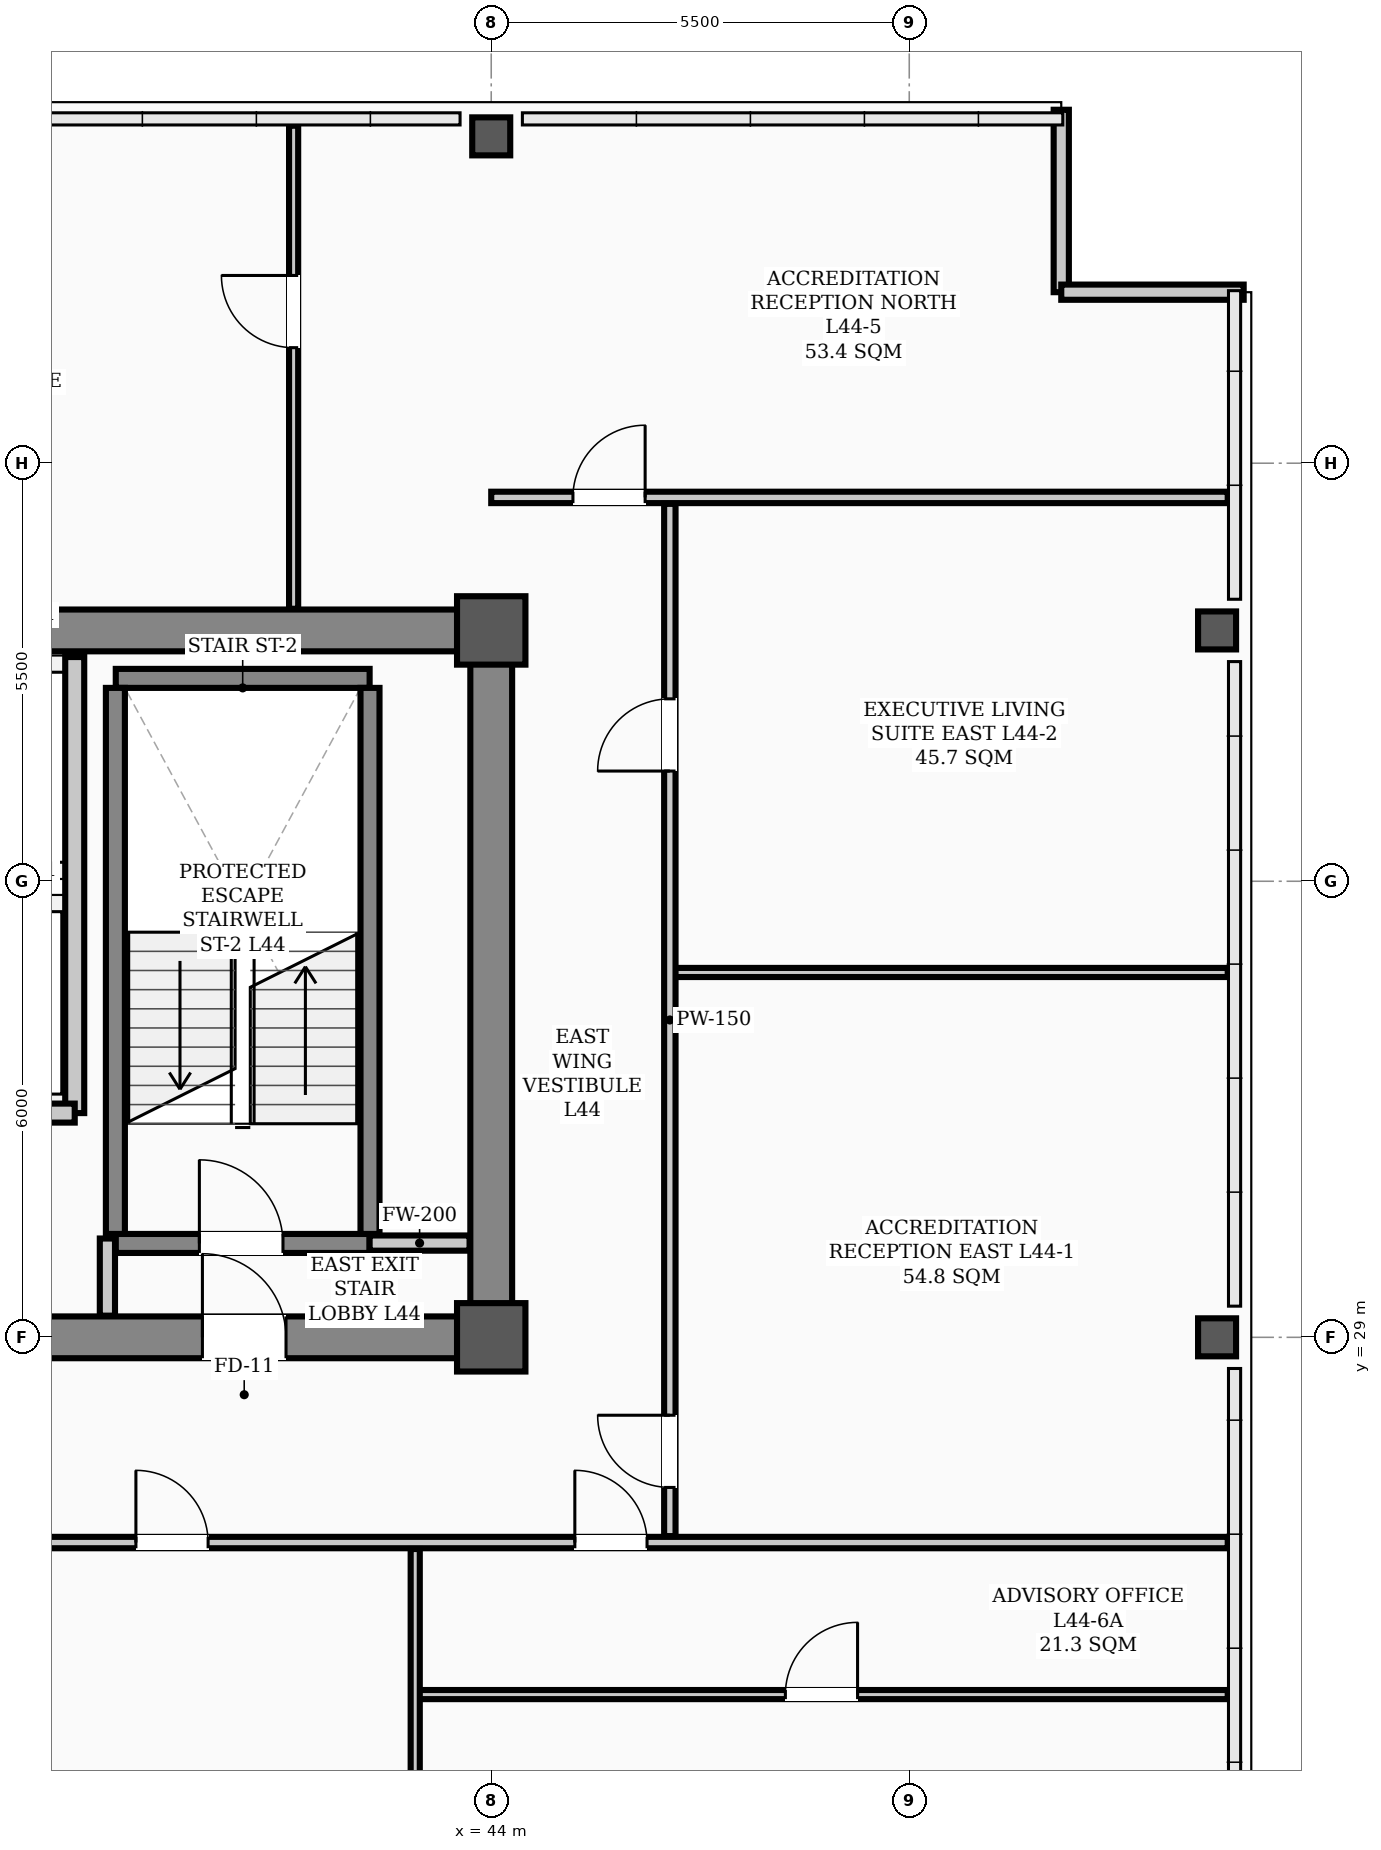
"""IFC4 building model, lengths in metres.
Left out: names, types, materials, properties, quantities, classifications, styles, units other than length and angle.
Written with IfcOpenShell. Run it as: python <this file> out.ifc"""

import sys

from ifc_helpers import new_model, si_unit, direction, frame, frame_2d, origin, origin_2d, place, context, subcontext, project, spatial, rectangle, hollow_rectangle, extrude, element, fill, save


model = new_model("IFC4")
c1 = context("Model", 3, precision=1e-05, world=origin(), true_north=direction((0.0, 1.0)))
c2 = subcontext(c1, "Body", "Model", "MODEL_VIEW")
j1 = project(units=[si_unit("LENGTHUNIT", "METRE"), si_unit("PLANEANGLEUNIT", "RADIAN")], contexts=[c1])
p1 = place(None, origin())
s1 = spatial("IfcSite", under=j1, at=p1, CompositionType="ELEMENT")
p2 = place(p1, origin())
s2 = spatial("IfcBuilding", under=s1, at=p2, CompositionType="ELEMENT")
p3 = place(p2, frame((0.0, 0.0, 177.3)))
s3 = spatial("IfcBuildingStorey", under=s2, at=p3, CompositionType="ELEMENT", Elevation=177.3)
for number, where, z_axis, x_axis in (
    (1, (44.0, 29.0, 0.0), (0.0, 0.0, 1.0), (1.0, 0.0, 0.0)),
    (2, (44.0, 38.3, 0.0), (0.0, 0.0, 1.0), (1.0, 0.0, 0.0)),
):
    element("IfcColumn", number, at=place(p3, frame(where, z_axis=z_axis, x_axis=x_axis)), inside=s3, PredefinedType="COLUMN", context=c2, shape_type="SweptSolid", body=[
        extrude(hollow_rectangle(XDim=0.9, YDim=0.9, WallThickness=0.035, InnerFilletRadius=0.017, OuterFilletRadius=0.052, at=origin_2d()), origin(), (0.0, 0.0, 1.0), 3.9),
    ])
for number, where, z_axis, x_axis in (
    (3, (44.0, 44.8, 0.0), (0.0, 0.0, 1.0), (1.0, 0.0, 0.0)),
    (4, (53.55, 29.0, 0.0), (0.0, 0.0, 1.0), (1.0, 0.0, 0.0)),
    (5, (53.55, 38.3, 0.0), (0.0, 0.0, 1.0), (1.0, 0.0, 0.0)),
):
    element("IfcColumn", number, at=place(p3, frame(where, z_axis=z_axis, x_axis=x_axis)), inside=s3, PredefinedType="COLUMN", context=c2, shape_type="SweptSolid", body=[
        extrude(hollow_rectangle(XDim=0.5, YDim=0.5, WallThickness=0.024, InnerFilletRadius=0.012, OuterFilletRadius=0.036, at=origin_2d()), origin(), (0.0, 0.0, 1.0), 3.9),
    ])
for number, where, z_axis, x_axis in (
    (6, (51.5, 45.15, 0.0), (0.0, 0.0, 1.0), (0.0, -1.0, 0.0)),
    (7, (51.5, 42.75, 0.0), (0.0, 0.0, 1.0), (1.0, 0.0, 0.0)),
):
    element("IfcWall", number, at=place(p3, frame(where, z_axis=z_axis, x_axis=x_axis)), inside=s3, PredefinedType="PARAPET", context=c2, shape_type="SweptSolid", body=[
        extrude(rectangle(XDim=2.4, YDim=0.2, at=frame_2d((1.2, 0.0))), origin(), (0.0, 0.0, 1.0), 1.2),
    ])
p4 = place(p3, frame((13.5, 29.0, 0.0), z_axis=(0.0, 0.0, 1.0), x_axis=(1.0, 0.0, 0.0)))
e8 = element("IfcWall", 8, at=p4, inside=s3, PredefinedType="SHEAR", context=c2, shape_type="SweptSolid", body=[
    extrude(rectangle(XDim=30.5, YDim=0.55, at=frame_2d((15.25, 0.0))), origin(), (0.0, 0.0, 1.0), 3.72),
])
p5 = place(p4, frame((1.75, 0.0, 0.0)))
e9 = element("IfcOpeningElement", 9, at=p5, cuts=e8, PredefinedType="OPENING", context=c2, shape_type="SweptSolid", body=[
    extrude(rectangle(XDim=1.1, YDim=2.08, at=frame_2d((0.55, 1.04))), frame((0.0, 0.285, 0.0), z_axis=(0.0, -1.0, 0.0), x_axis=(1.0, 0.0, 0.0)), (0.0, 0.0, 1.0), 0.57),
])
p6 = place(p4, frame((26.7, 0.0, 0.0)))
e10 = element("IfcOpeningElement", 10, at=p6, cuts=e8, PredefinedType="OPENING", context=c2, shape_type="SweptSolid", body=[
    extrude(rectangle(XDim=1.1, YDim=2.08, at=frame_2d((0.55, 1.04))), frame((0.0, 0.285, 0.0), z_axis=(0.0, -1.0, 0.0), x_axis=(1.0, 0.0, 0.0)), (0.0, 0.0, 1.0), 0.57),
])
p7 = place(p4, frame((6.8, 0.0, 0.0)))
e11 = element("IfcOpeningElement", 11, at=p7, cuts=e8, PredefinedType="OPENING", context=c2, shape_type="SweptSolid", body=[
    extrude(rectangle(XDim=1.1, YDim=2.08, at=frame_2d((0.55, 1.04))), frame((0.0, 0.285, 0.0), z_axis=(0.0, -1.0, 0.0), x_axis=(1.0, 0.0, 0.0)), (0.0, 0.0, 1.0), 0.57),
])
p8 = place(p4, frame((13.2, 0.0, 0.0)))
e12 = element("IfcOpeningElement", 12, at=p8, cuts=e8, PredefinedType="OPENING", context=c2, shape_type="SweptSolid", body=[
    extrude(rectangle(XDim=1.6, YDim=2.08, at=frame_2d((0.8, 1.04))), frame((0.0, 0.285, 0.0), z_axis=(0.0, -1.0, 0.0), x_axis=(1.0, 0.0, 0.0)), (0.0, 0.0, 1.0), 0.57),
])
p9 = place(p4, frame((19.53, 0.0, 0.0)))
e13 = element("IfcOpeningElement", 13, at=p9, cuts=e8, PredefinedType="OPENING", context=c2, shape_type="SweptSolid", body=[
    extrude(rectangle(XDim=0.9, YDim=2.08, at=frame_2d((0.45, 1.04))), frame((0.0, 0.285, 0.0), z_axis=(0.0, -1.0, 0.0), x_axis=(1.0, 0.0, 0.0)), (0.0, 0.0, 1.0), 0.57),
])
p10 = place(p4, frame((21.57, 0.0, 0.0)))
e14 = element("IfcOpeningElement", 14, at=p10, cuts=e8, PredefinedType="OPENING", context=c2, shape_type="SweptSolid", body=[
    extrude(rectangle(XDim=0.9, YDim=2.08, at=frame_2d((0.45, 1.04))), frame((0.0, 0.285, 0.0), z_axis=(0.0, -1.0, 0.0), x_axis=(1.0, 0.0, 0.0)), (0.0, 0.0, 1.0), 0.57),
])
p11 = place(p3, frame((13.5, 38.3, 0.0), z_axis=(0.0, 0.0, 1.0), x_axis=(1.0, 0.0, 0.0)))
e15 = element("IfcWall", 15, at=p11, inside=s3, PredefinedType="SHEAR", context=c2, shape_type="SweptSolid", body=[
    extrude(rectangle(XDim=30.5, YDim=0.55, at=frame_2d((15.25, 0.0))), origin(), (0.0, 0.0, 1.0), 3.72),
])
p12 = place(p3, frame((44.0, 29.35, 0.0), z_axis=(0.0, 0.0, 1.0), x_axis=(0.0, 1.0, 0.0)))
e16 = element("IfcWall", 16, at=p12, inside=s3, PredefinedType="SHEAR", context=c2, shape_type="SweptSolid", body=[
    extrude(rectangle(XDim=8.6, YDim=0.55, at=frame_2d((4.3, 0.0))), origin(), (0.0, 0.0, 1.0), 3.72),
])
p13 = place(p3, frame((39.06, 30.235, 0.0), z_axis=(0.0, 0.0, 1.0), x_axis=(1.0, 0.0, 0.0)))
e17 = element("IfcWall", 17, at=p13, inside=s3, PredefinedType="STANDARD", context=c2, shape_type="SweptSolid", body=[
    extrude(rectangle(XDim=3.34, YDim=0.25, at=frame_2d((1.67, 0.0))), origin(), (0.0, 0.0, 1.0), 3.72),
])
p14 = place(p13, frame((1.1, 0.0, 0.0)))
e18 = element("IfcOpeningElement", 18, at=p14, cuts=e17, PredefinedType="OPENING", context=c2, shape_type="SweptSolid", body=[
    extrude(rectangle(XDim=1.1, YDim=2.08, at=frame_2d((0.55, 1.04))), frame((0.0, 0.135, 0.0), z_axis=(0.0, -1.0, 0.0), x_axis=(1.0, 0.0, 0.0)), (0.0, 0.0, 1.0), 0.27),
])
p15 = place(p3, frame((39.06, 37.669, 0.0), z_axis=(0.0, 0.0, 1.0), x_axis=(1.0, 0.0, 0.0)))
e19 = element("IfcWall", 19, at=p15, inside=s3, PredefinedType="STANDARD", context=c2, shape_type="SweptSolid", body=[
    extrude(rectangle(XDim=3.34, YDim=0.25, at=frame_2d((1.67, 0.0))), origin(), (0.0, 0.0, 1.0), 3.72),
])
for number, where, z_axis, x_axis in (
    (20, (39.055, 30.36, 0.0), (0.0, 0.0, 1.0), (0.0, 1.0, 0.0)),
    (21, (42.405, 30.36, 0.0), (0.0, 0.0, 1.0), (0.0, 1.0, 0.0)),
):
    element("IfcWall", number, at=place(p3, frame(where, z_axis=z_axis, x_axis=x_axis)), inside=s3, PredefinedType="STANDARD", context=c2, shape_type="SweptSolid", body=[
        extrude(rectangle(XDim=7.184, YDim=0.25, at=frame_2d((3.592, 0.0))), origin(), (0.0, 0.0, 1.0), 3.72),
    ])
p16 = place(p3, frame((38.52, 31.95, 0.0), z_axis=(0.0, 0.0, 1.0), x_axis=(0.0, 1.0, 0.0)))
e22 = element("IfcWall", 22, at=p16, inside=s3, PredefinedType="STANDARD", context=c2, shape_type="SweptSolid", body=[
    extrude(rectangle(XDim=6.0, YDim=0.25, at=frame_2d((3.0, 0.0))), origin(), (0.0, 0.0, 1.0), 3.35),
])
p17 = place(p3, frame((36.62, 31.95, 0.0), z_axis=(0.0, 0.0, 1.0), x_axis=(1.0, 0.0, 0.0)))
e23 = element("IfcWall", 23, at=p17, inside=s3, PredefinedType="STANDARD", context=c2, shape_type="SweptSolid", body=[
    extrude(rectangle(XDim=1.9, YDim=0.25, at=frame_2d((0.95, 0.0))), origin(), (0.0, 0.0, 1.0), 3.48),
])
p18 = place(p3, frame((42.4, 30.24, 0.0), z_axis=(0.0, 0.0, 1.0), x_axis=(1.0, 0.0, 0.0)))
e24 = element("IfcWall", 24, at=p18, inside=s3, PredefinedType="STANDARD", context=c2, shape_type="SweptSolid", body=[
    extrude(rectangle(XDim=1.315, YDim=0.2, at=frame_2d((0.658, 0.0))), origin(), (0.0, 0.0, 1.0), 3.2),
])
p19 = place(p3, frame((10.31, 26.3, 0.0), z_axis=(0.0, 0.0, 1.0), x_axis=(1.0, 0.0, 0.0)))
e25 = element("IfcWall", 25, at=p19, inside=s3, PredefinedType="PARTITIONING", context=c2, shape_type="SweptSolid", body=[
    extrude(rectangle(XDim=43.38, YDim=0.15, at=frame_2d((21.69, 0.0))), origin(), (0.0, 0.0, 1.0), 3.2),
])
p20 = place(p19, frame((0.575, 0.0, 0.0)))
e26 = element("IfcOpeningElement", 26, at=p20, cuts=e25, PredefinedType="OPENING", context=c2, shape_type="SweptSolid", body=[
    extrude(rectangle(XDim=0.95, YDim=2.08, at=frame_2d((0.475, 1.04))), frame((0.0, 0.085, 0.0), z_axis=(0.0, -1.0, 0.0), x_axis=(1.0, 0.0, 0.0)), (0.0, 0.0, 1.0), 0.17),
])
p21 = place(p19, frame((9.415, 0.0, 0.0)))
e27 = element("IfcOpeningElement", 27, at=p21, cuts=e25, PredefinedType="OPENING", context=c2, shape_type="SweptSolid", body=[
    extrude(rectangle(XDim=0.95, YDim=2.08, at=frame_2d((0.475, 1.04))), frame((0.0, 0.085, 0.0), z_axis=(0.0, -1.0, 0.0), x_axis=(1.0, 0.0, 0.0)), (0.0, 0.0, 1.0), 0.17),
])
p22 = place(p19, frame((16.115, 0.0, 0.0)))
e28 = element("IfcOpeningElement", 28, at=p22, cuts=e25, PredefinedType="OPENING", context=c2, shape_type="SweptSolid", body=[
    extrude(rectangle(XDim=0.95, YDim=2.08, at=frame_2d((0.475, 1.04))), frame((0.0, 0.085, 0.0), z_axis=(0.0, -1.0, 0.0), x_axis=(1.0, 0.0, 0.0)), (0.0, 0.0, 1.0), 0.17),
])
p23 = place(p19, frame((22.715, 0.0, 0.0)))
e29 = element("IfcOpeningElement", 29, at=p23, cuts=e25, PredefinedType="OPENING", context=c2, shape_type="SweptSolid", body=[
    extrude(rectangle(XDim=0.95, YDim=2.08, at=frame_2d((0.475, 1.04))), frame((0.0, 0.085, 0.0), z_axis=(0.0, -1.0, 0.0), x_axis=(1.0, 0.0, 0.0)), (0.0, 0.0, 1.0), 0.17),
])
p24 = place(p19, frame((29.015, 0.0, 0.0)))
e30 = element("IfcOpeningElement", 30, at=p24, cuts=e25, PredefinedType="OPENING", context=c2, shape_type="SweptSolid", body=[
    extrude(rectangle(XDim=0.95, YDim=2.08, at=frame_2d((0.475, 1.04))), frame((0.0, 0.085, 0.0), z_axis=(0.0, -1.0, 0.0), x_axis=(1.0, 0.0, 0.0)), (0.0, 0.0, 1.0), 0.17),
])
p25 = place(p19, frame((34.79, 0.0, 0.0)))
e31 = element("IfcOpeningElement", 31, at=p25, cuts=e25, PredefinedType="OPENING", context=c2, shape_type="SweptSolid", body=[
    extrude(rectangle(XDim=0.95, YDim=2.08, at=frame_2d((0.475, 1.04))), frame((0.0, 0.085, 0.0), z_axis=(0.0, -1.0, 0.0), x_axis=(1.0, 0.0, 0.0)), (0.0, 0.0, 1.0), 0.17),
])
p26 = place(p3, frame((43.0, 24.3, 0.0), z_axis=(0.0, 0.0, 1.0), x_axis=(1.0, 0.0, 0.0)))
e32 = element("IfcWall", 32, at=p26, inside=s3, PredefinedType="PARTITIONING", context=c2, shape_type="SweptSolid", body=[
    extrude(rectangle(XDim=10.69, YDim=0.12, at=frame_2d((5.345, 0.0))), origin(), (0.0, 0.0, 1.0), 3.2),
])
p27 = place(p26, frame((4.87, 0.0, 0.0)))
e33 = element("IfcOpeningElement", 33, at=p27, cuts=e32, PredefinedType="OPENING", context=c2, shape_type="SweptSolid", body=[
    extrude(rectangle(XDim=0.95, YDim=2.08, at=frame_2d((0.475, 1.04))), frame((0.0, 0.07, 0.0), z_axis=(0.0, -1.0, 0.0), x_axis=(1.0, 0.0, 0.0)), (0.0, 0.0, 1.0), 0.14),
])
p28 = place(p3, frame((46.35, 33.8, 0.0), z_axis=(0.0, 0.0, 1.0), x_axis=(1.0, 0.0, 0.0)))
e34 = element("IfcWall", 34, at=p28, inside=s3, PredefinedType="PARTITIONING", context=c2, shape_type="SweptSolid", body=[
    extrude(rectangle(XDim=7.34, YDim=0.12, at=frame_2d((3.67, 0.0))), origin(), (0.0, 0.0, 1.0), 3.212),
])
p29 = place(p3, frame((44.0, 40.05, 0.0), z_axis=(0.0, 0.0, 1.0), x_axis=(1.0, 0.0, 0.0)))
e35 = element("IfcWall", 35, at=p29, inside=s3, PredefinedType="PARTITIONING", context=c2, shape_type="SweptSolid", body=[
    extrude(rectangle(XDim=9.69, YDim=0.15, at=frame_2d((4.845, 0.0))), origin(), (0.0, 0.0, 1.0), 3.2),
])
p30 = place(p29, frame((1.075, 0.0, 0.0)))
e36 = element("IfcOpeningElement", 36, at=p30, cuts=e35, PredefinedType="OPENING", context=c2, shape_type="SweptSolid", body=[
    extrude(rectangle(XDim=0.95, YDim=2.08, at=frame_2d((0.475, 1.04))), frame((0.0, 0.085, 0.0), z_axis=(0.0, -1.0, 0.0), x_axis=(1.0, 0.0, 0.0)), (0.0, 0.0, 1.0), 0.17),
])
p31 = place(p3, frame((38.95, 29.285, 0.0), z_axis=(0.0, 0.0, 1.0), x_axis=(0.0, 1.0, 0.0)))
e37 = element("IfcWall", 37, at=p31, inside=s3, PredefinedType="STANDARD", context=c2, shape_type="SweptSolid", body=[
    extrude(rectangle(XDim=1.015, YDim=0.2, at=frame_2d((0.508, 0.0))), origin(), (0.0, 0.0, 1.0), 3.35),
])
p32 = place(p3, frame((46.35, 26.385, 0.0), z_axis=(0.0, 0.0, 1.0), x_axis=(0.0, 1.0, 0.0)))
e38 = element("IfcWall", 38, at=p32, inside=s3, PredefinedType="PARTITIONING", context=c2, shape_type="SweptSolid", body=[
    extrude(rectangle(XDim=13.58, YDim=0.15, at=frame_2d((6.79, 0.0))), origin(), (0.0, 0.0, 1.0), 3.1),
])
p33 = place(p32, frame((0.64, 0.0, 0.0)))
e39 = element("IfcOpeningElement", 39, at=p33, cuts=e38, PredefinedType="OPENING", context=c2, shape_type="SweptSolid", body=[
    extrude(rectangle(XDim=0.95, YDim=2.08, at=frame_2d((0.475, 1.04))), frame((0.0, 0.085, 0.0), z_axis=(0.0, -1.0, 0.0), x_axis=(1.0, 0.0, 0.0)), (0.0, 0.0, 1.0), 0.17),
])
p34 = place(p32, frame((10.065, 0.0, 0.0)))
e40 = element("IfcOpeningElement", 40, at=p34, cuts=e38, PredefinedType="OPENING", context=c2, shape_type="SweptSolid", body=[
    extrude(rectangle(XDim=0.95, YDim=2.08, at=frame_2d((0.475, 1.04))), frame((0.0, 0.085, 0.0), z_axis=(0.0, -1.0, 0.0), x_axis=(1.0, 0.0, 0.0)), (0.0, 0.0, 1.0), 0.17),
])
p35 = place(p3, frame((43.0, 17.06, 0.0), z_axis=(0.0, 0.0, 1.0), x_axis=(0.0, 1.0, 0.0)))
e41 = element("IfcWall", 41, at=p35, inside=s3, PredefinedType="PARTITIONING", context=c2, shape_type="SweptSolid", body=[
    extrude(rectangle(XDim=9.155, YDim=0.12, at=frame_2d((4.578, 0.0))), origin(), (0.0, 0.0, 1.0), 3.1),
])
p36 = place(p3, frame((41.4, 38.585, 0.0), z_axis=(0.0, 0.0, 1.0), x_axis=(0.0, 1.0, 0.0)))
e42 = element("IfcWall", 42, at=p36, inside=s3, PredefinedType="PARTITIONING", context=c2, shape_type="SweptSolid", body=[
    extrude(rectangle(XDim=6.355, YDim=0.12, at=frame_2d((3.177, 0.0))), origin(), (0.0, 0.0, 1.0), 3.212),
])
p37 = place(p36, frame((3.435, 0.0, 0.0)))
e43 = element("IfcOpeningElement", 43, at=p37, cuts=e42, PredefinedType="OPENING", context=c2, shape_type="SweptSolid", body=[
    extrude(rectangle(XDim=0.95, YDim=2.08, at=frame_2d((0.475, 1.04))), frame((0.0, 0.07, 0.0), z_axis=(0.0, -1.0, 0.0), x_axis=(1.0, 0.0, 0.0)), (0.0, 0.0, 1.0), 0.14),
])
p38 = place(p14, origin())
e44 = element("IfcDoor", 44, at=p38, inside=s3, OperationType="SINGLE_SWING_LEFT", PredefinedType="DOOR", context=c2, shape_type="SweptSolid", body=[
    extrude(rectangle(XDim=1.1, YDim=2.08, at=frame_2d((0.55, 1.04))), frame((0.0, 0.025, 0.0), z_axis=(0.0, -1.0, 0.0), x_axis=(1.0, 0.0, 0.0)), (0.0, 0.0, 1.0), 0.05),
])
fill(e18, e44)
p39 = place(p6, origin())
e45 = element("IfcDoor", 45, at=p39, inside=s3, OperationType="SINGLE_SWING_LEFT", PredefinedType="DOOR", context=c2, shape_type="SweptSolid", body=[
    extrude(rectangle(XDim=1.1, YDim=2.08, at=frame_2d((0.55, 1.04))), frame((0.0, 0.025, 0.0), z_axis=(0.0, -1.0, 0.0), x_axis=(1.0, 0.0, 0.0)), (0.0, 0.0, 1.0), 0.05),
])
fill(e10, e45)
p40 = place(p24, origin())
e46 = element("IfcDoor", 46, at=p40, inside=s3, OperationType="SINGLE_SWING_LEFT", PredefinedType="DOOR", context=c2, shape_type="SweptSolid", body=[
    extrude(rectangle(XDim=0.95, YDim=2.08, at=frame_2d((0.475, 1.04))), frame((0.0, 0.025, 0.0), z_axis=(0.0, -1.0, 0.0), x_axis=(1.0, 0.0, 0.0)), (0.0, 0.0, 1.0), 0.05),
])
fill(e30, e46)
p41 = place(p27, origin())
e47 = element("IfcDoor", 47, at=p41, inside=s3, OperationType="SINGLE_SWING_RIGHT", PredefinedType="DOOR", context=c2, shape_type="SweptSolid", body=[
    extrude(rectangle(XDim=0.95, YDim=2.08, at=frame_2d((0.475, 1.04))), frame((0.0, 0.025, 0.0), z_axis=(0.0, -1.0, 0.0), x_axis=(1.0, 0.0, 0.0)), (0.0, 0.0, 1.0), 0.05),
])
fill(e33, e47)
p42 = place(p25, origin())
e48 = element("IfcDoor", 48, at=p42, inside=s3, OperationType="SINGLE_SWING_LEFT", PredefinedType="DOOR", context=c2, shape_type="SweptSolid", body=[
    extrude(rectangle(XDim=0.95, YDim=2.08, at=frame_2d((0.475, 1.04))), frame((0.0, 0.025, 0.0), z_axis=(0.0, -1.0, 0.0), x_axis=(1.0, 0.0, 0.0)), (0.0, 0.0, 1.0), 0.05),
])
fill(e31, e48)
p43 = place(p33, origin())
e49 = element("IfcDoor", 49, at=p43, inside=s3, OperationType="SINGLE_SWING_RIGHT", PredefinedType="DOOR", context=c2, shape_type="SweptSolid", body=[
    extrude(rectangle(XDim=0.95, YDim=2.08, at=frame_2d((0.475, 1.04))), frame((0.0, 0.025, 0.0), z_axis=(0.0, -1.0, 0.0), x_axis=(1.0, 0.0, 0.0)), (0.0, 0.0, 1.0), 0.05),
])
fill(e39, e49)
p44 = place(p34, origin())
e50 = element("IfcDoor", 50, at=p44, inside=s3, OperationType="SINGLE_SWING_LEFT", PredefinedType="DOOR", context=c2, shape_type="SweptSolid", body=[
    extrude(rectangle(XDim=0.95, YDim=2.08, at=frame_2d((0.475, 1.04))), frame((0.0, 0.025, 0.0), z_axis=(0.0, -1.0, 0.0), x_axis=(1.0, 0.0, 0.0)), (0.0, 0.0, 1.0), 0.05),
])
fill(e40, e50)
p45 = place(p30, origin())
e51 = element("IfcDoor", 51, at=p45, inside=s3, OperationType="SINGLE_SWING_RIGHT", PredefinedType="DOOR", context=c2, shape_type="SweptSolid", body=[
    extrude(rectangle(XDim=0.95, YDim=2.08, at=frame_2d((0.475, 1.04))), frame((0.0, 0.025, 0.0), z_axis=(0.0, -1.0, 0.0), x_axis=(1.0, 0.0, 0.0)), (0.0, 0.0, 1.0), 0.05),
])
fill(e36, e51)
p46 = place(p37, origin())
e52 = element("IfcDoor", 52, at=p46, inside=s3, OperationType="SINGLE_SWING_RIGHT", PredefinedType="DOOR", context=c2, shape_type="SweptSolid", body=[
    extrude(rectangle(XDim=0.95, YDim=2.08, at=frame_2d((0.475, 1.04))), frame((0.0, 0.025, 0.0), z_axis=(0.0, -1.0, 0.0), x_axis=(1.0, 0.0, 0.0)), (0.0, 0.0, 1.0), 0.05),
])
fill(e43, e52)
save(model, sys.argv[1])
